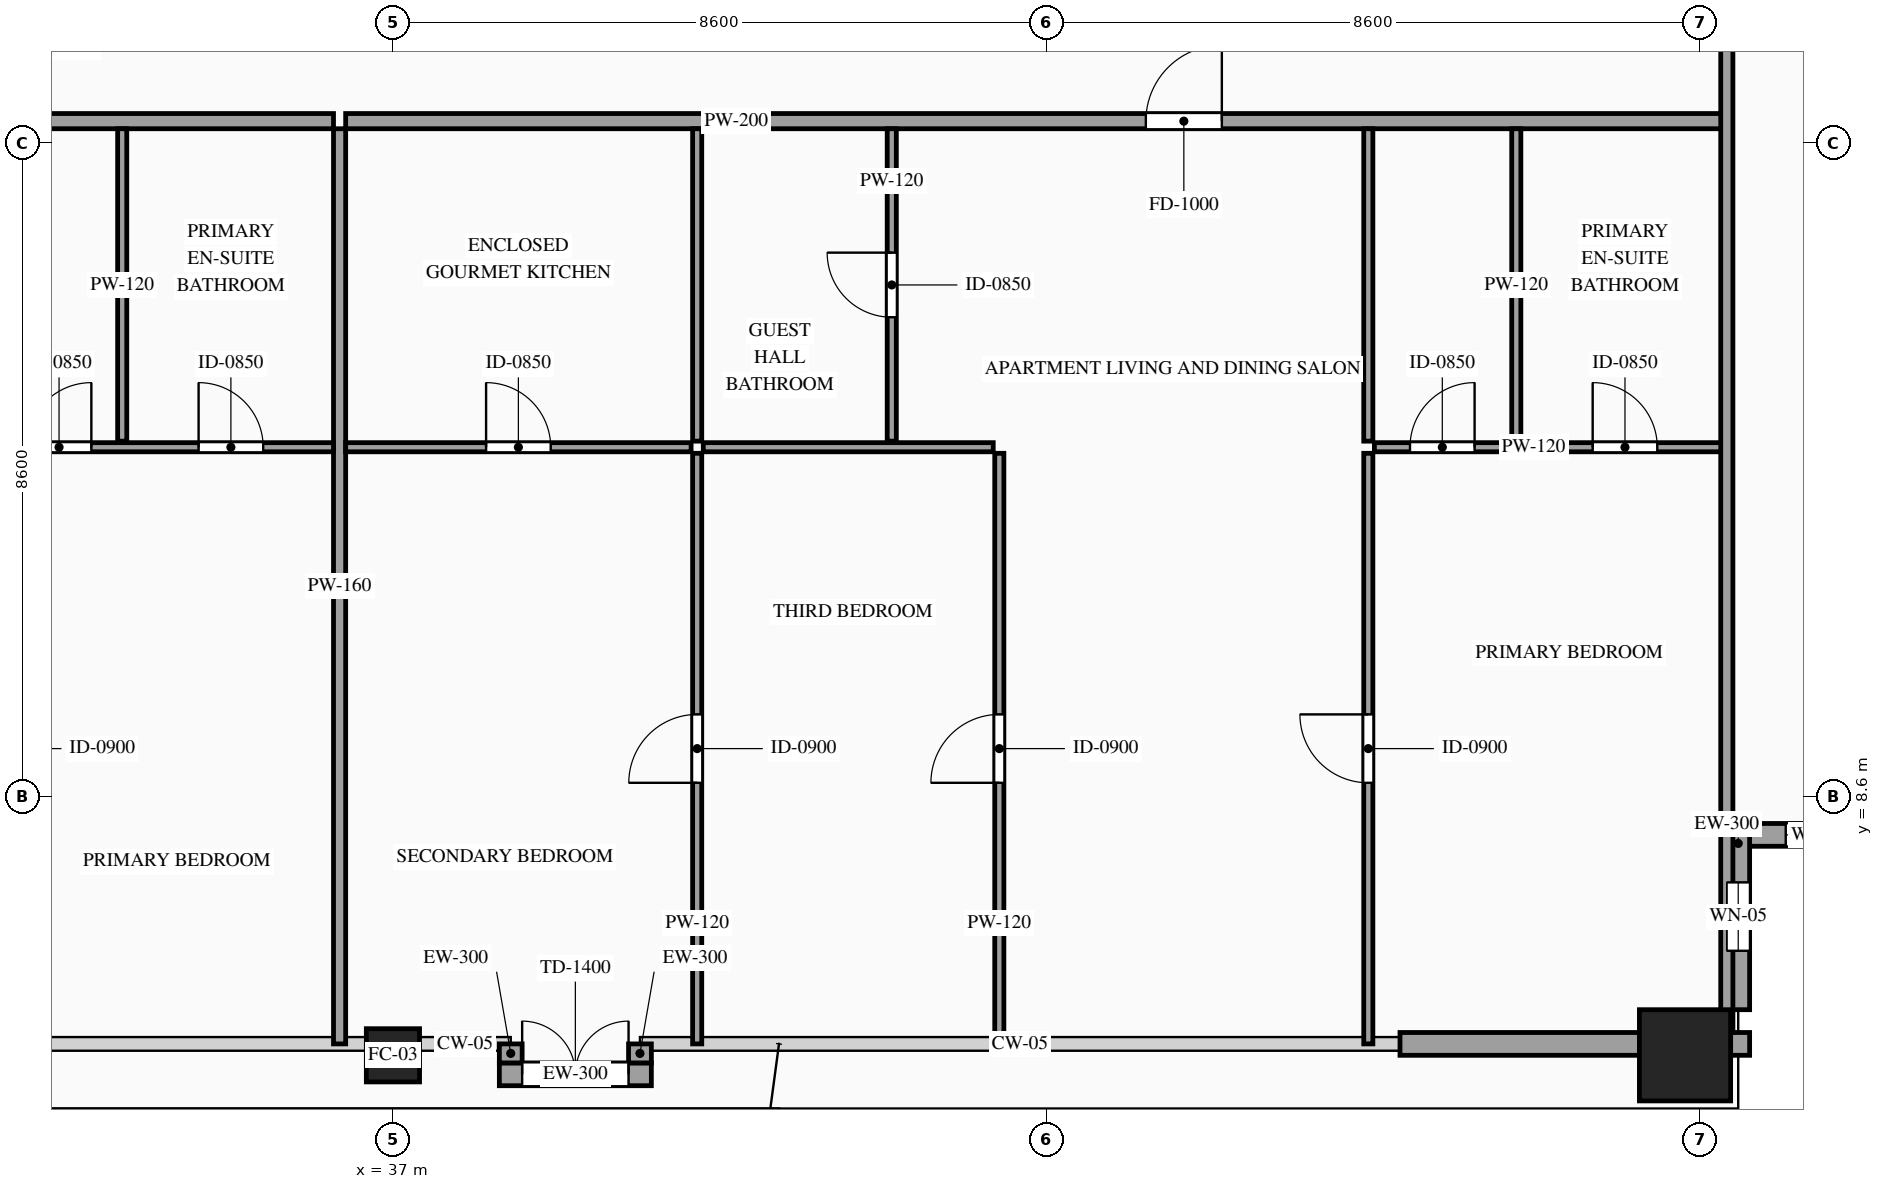
"""IFC4 building model, lengths in metres.
Left out: names, types, materials, properties, quantities, classifications, styles, units other than length and angle.
Written with IfcOpenShell. Run it as: python <this file> out.ifc"""

import sys

from ifc_helpers import new_model, si_unit, direction, frame, frame_2d, origin, origin_2d, place, context, subcontext, project, spatial, rectangle, hollow_rectangle, extrude, source, transform, mapped, element, fill, save


model = new_model("IFC4")
c1 = context("Model", 3, precision=1e-05, world=origin(), true_north=direction((0.0, 1.0)))
c2 = subcontext(c1, "Body", "Model", "MODEL_VIEW")
j1 = project(units=[si_unit("LENGTHUNIT", "METRE"), si_unit("PLANEANGLEUNIT", "RADIAN")], contexts=[c1])
p1 = place(None, origin())
s1 = spatial("IfcSite", under=j1, at=p1, CompositionType="ELEMENT")
p2 = place(p1, origin())
s2 = spatial("IfcBuilding", under=s1, at=p2, CompositionType="ELEMENT")
p3 = place(p2, frame((0.0, 0.0, 255.6)))
s3 = spatial("IfcBuildingStorey", under=s2, at=p3, CompositionType="ELEMENT", Elevation=255.6)
m1 = source(origin(), c2, "Body", "SweptSolid", [
    extrude(hollow_rectangle(XDim=0.7, YDim=0.7, WallThickness=0.032, at=origin_2d()), origin(), (0.0, 0.0, 1.0), 3.5),
])
p4 = place(p3, frame((37.0, 5.2, 0.0), z_axis=(0.0, 0.0, 1.0), x_axis=(1.0, 0.0, 0.0)))
e1 = element("IfcColumn", 1, at=p4, inside=s3, PredefinedType="COLUMN", context=c2, shape_type="MappedRepresentation", body=[
    mapped(m1, transform((0.0, 0.0, 0.0), scale=1.0)),
])
m2 = source(origin(), c2, "Body", "SweptSolid", [
    extrude(hollow_rectangle(XDim=1.2, YDim=1.2, WallThickness=0.055, at=origin_2d()), origin(), (0.0, 0.0, 1.0), 3.5),
])
p5 = place(p3, frame((54.0, 5.2, 0.0), z_axis=(0.0, 0.0, 1.0), x_axis=(1.0, 0.0, 0.0)))
e2 = element("IfcColumn", 2, at=p5, inside=s3, PredefinedType="COLUMN", context=c2, shape_type="MappedRepresentation", body=[
    mapped(m2, transform((0.0, 0.0, 0.0), scale=1.0)),
])
p6 = place(p3, frame((54.55, 8.1, 0.0), z_axis=(0.0, 0.0, 1.0), x_axis=(1.0, 0.0, 0.0)))
e3 = element("IfcWall", 3, at=p6, inside=s3, PredefinedType="SOLIDWALL", context=c2, shape_type="SweptSolid", body=[
    extrude(rectangle(XDim=2.45, YDim=0.3, at=frame_2d((1.225, 0.0))), origin(), (0.0, 0.0, 1.0), 3.2),
])
p7 = place(p6, frame((0.775, 0.0, 0.75)))
e4 = element("IfcOpeningElement", 4, at=p7, cuts=e3, PredefinedType="OPENING", context=c2, shape_type="SweptSolid", body=[
    extrude(rectangle(XDim=0.9, YDim=1.5, at=frame_2d((0.45, 0.75))), frame((0.0, 0.165, 0.0), z_axis=(0.0, -1.0, 0.0), x_axis=(1.0, 0.0, 0.0)), (0.0, 0.0, 1.0), 0.33),
])
p8 = place(p3, frame((54.7, 5.8, 0.0), z_axis=(0.0, 0.0, 1.0), x_axis=(0.0, 1.0, 0.0)))
e5 = element("IfcWall", 5, at=p8, inside=s3, PredefinedType="SOLIDWALL", context=c2, shape_type="SweptSolid", body=[
    extrude(rectangle(XDim=2.45, YDim=0.3, at=frame_2d((1.225, 0.0))), origin(), (0.0, 0.0, 1.0), 3.2),
])
p9 = place(p8, frame((0.775, 0.0, 0.75)))
e6 = element("IfcOpeningElement", 6, at=p9, cuts=e5, PredefinedType="OPENING", context=c2, shape_type="SweptSolid", body=[
    extrude(rectangle(XDim=0.9, YDim=1.5, at=frame_2d((0.45, 0.75))), frame((0.0, 0.165, 0.0), z_axis=(0.0, -1.0, 0.0), x_axis=(1.0, 0.0, 0.0)), (0.0, 0.0, 1.0), 0.33),
])
m3 = source(origin(), c2, "Body", "SweptSolid", [
    extrude(rectangle(XDim=0.25, YDim=0.3, at=frame_2d((0.125, 0.0))), origin(), (0.0, 0.0, 1.0), 3.2),
])
p10 = place(p3, frame((54.6, 5.35, 0.0), z_axis=(0.0, 0.0, 1.0), x_axis=(1.0, 0.0, 0.0)))
e7 = element("IfcWall", 7, at=p10, inside=s3, PredefinedType="SOLIDWALL", context=c2, shape_type="MappedRepresentation", body=[
    mapped(m3, transform((0.0, 0.0, 0.0), scale=1.0)),
])
m4 = source(origin(), c2, "Body", "SweptSolid", [
    extrude(rectangle(XDim=3.15, YDim=0.3, at=frame_2d((1.575, 0.0))), origin(), (0.0, 0.0, 1.0), 2.755),
])
p11 = place(p3, frame((50.25, 5.35, 0.0), z_axis=(0.0, 0.0, 1.0), x_axis=(1.0, 0.0, 0.0)))
e8 = element("IfcWall", 8, at=p11, inside=s3, PredefinedType="SOLIDWALL", context=c2, shape_type="MappedRepresentation", body=[
    mapped(m4, transform((0.0, 0.0, 0.0), scale=1.0)),
])
p12 = place(p3, frame((38.4, 4.95, 0.0), z_axis=(0.0, 0.0, 1.0), x_axis=(1.0, 0.0, 0.0)))
e9 = element("IfcWall", 9, at=p12, inside=s3, PredefinedType="SOLIDWALL", context=c2, shape_type="SweptSolid", body=[
    extrude(rectangle(XDim=2.0, YDim=0.3, at=frame_2d((1.0, 0.0))), origin(), (0.0, 0.0, 1.0), 2.755),
])
p13 = place(p12, frame((0.3, 0.0, 0.0)))
e10 = element("IfcOpeningElement", 10, at=p13, cuts=e9, PredefinedType="OPENING", context=c2, shape_type="SweptSolid", body=[
    extrude(rectangle(XDim=1.4, YDim=2.3, at=frame_2d((0.7, 1.15))), frame((0.0, 0.165, 0.0), z_axis=(0.0, -1.0, 0.0), x_axis=(1.0, 0.0, 0.0)), (0.0, 0.0, 1.0), 0.33),
])
for number, where, z_axis, x_axis in (
    (11, (38.55, 5.35, 0.0), (0.0, 0.0, 1.0), (0.0, -1.0, 0.0)),
    (12, (40.25, 5.1, 0.0), (0.0, 0.0, 1.0), (0.0, 1.0, 0.0)),
):
    element("IfcWall", number, at=place(p3, frame(where, z_axis=z_axis, x_axis=x_axis)), inside=s3, PredefinedType="SOLIDWALL", context=c2, shape_type="MappedRepresentation", body=[
        mapped(m3, transform((0.0, 0.0, 0.0), scale=1.0)),
    ])
p14 = place(p3, frame((19.44, 17.49, 0.0), z_axis=(0.0, 0.0, 1.0), x_axis=(1.0, 0.0, 0.0)))
e13 = element("IfcWall", 13, at=p14, inside=s3, PredefinedType="PARTITIONING", context=c2, shape_type="SweptSolid", body=[
    extrude(rectangle(XDim=16.778, YDim=0.2, at=frame_2d((8.389, 0.0))), origin(), (0.0, 0.0, 1.0), 3.2),
])
p15 = place(p14, frame((9.695, 0.0, 0.0)))
e14 = element("IfcOpeningElement", 14, at=p15, cuts=e13, PredefinedType="OPENING", context=c2, shape_type="SweptSolid", body=[
    extrude(rectangle(XDim=1.0, YDim=2.2, at=frame_2d((0.5, 1.1))), frame((0.0, 0.115, 0.0), z_axis=(0.0, -1.0, 0.0), x_axis=(1.0, 0.0, 0.0)), (0.0, 0.0, 1.0), 0.23),
])
m5 = source(origin(), c2, "Body", "SweptSolid", [
    extrude(rectangle(XDim=12.04, YDim=0.16, at=frame_2d((6.02, 0.0))), origin(), (0.0, 0.0, 1.0), 3.2),
])
p16 = place(p3, frame((36.298, 5.35, 0.0), z_axis=(0.0, 0.0, 1.0), x_axis=(0.0, 1.0, 0.0)))
e15 = element("IfcWall", 15, at=p16, inside=s3, PredefinedType="PARTITIONING", context=c2, shape_type="MappedRepresentation", body=[
    mapped(m5, transform((0.0, 0.0, 0.0), scale=1.0)),
])
m6 = source(origin(), c2, "Body", "SweptSolid", [
    extrude(rectangle(XDim=4.11, YDim=0.12, at=frame_2d((2.055, 0.0))), origin(), (0.0, 0.0, 1.0), 3.2),
])
p17 = place(p3, frame((33.438, 13.28, 0.0), z_axis=(0.0, 0.0, 1.0), x_axis=(0.0, 1.0, 0.0)))
e16 = element("IfcWall", 16, at=p17, inside=s3, PredefinedType="PARTITIONING", context=c2, shape_type="MappedRepresentation", body=[
    mapped(m6, transform((0.0, 0.0, 0.0), scale=1.0)),
])
p18 = place(p3, frame((31.856, 13.2, 0.0), z_axis=(0.0, 0.0, 1.0), x_axis=(1.0, 0.0, 0.0)))
e17 = element("IfcWall", 17, at=p18, inside=s3, PredefinedType="PARTITIONING", context=c2, shape_type="SweptSolid", body=[
    extrude(rectangle(XDim=4.362, YDim=0.12, at=frame_2d((2.181, 0.0))), origin(), (0.0, 0.0, 1.0), 3.2),
])
p19 = place(p18, frame((2.587, 0.0, 0.0)))
e18 = element("IfcOpeningElement", 18, at=p19, cuts=e17, PredefinedType="OPENING", context=c2, shape_type="SweptSolid", body=[
    extrude(rectangle(XDim=0.85, YDim=2.1, at=frame_2d((0.425, 1.05))), frame((0.0, 0.075, 0.0), z_axis=(0.0, -1.0, 0.0), x_axis=(1.0, 0.0, 0.0)), (0.0, 0.0, 1.0), 0.15),
])
p20 = place(p18, frame((0.326, 0.0, 0.0)))
e19 = element("IfcOpeningElement", 19, at=p20, cuts=e17, PredefinedType="OPENING", context=c2, shape_type="SweptSolid", body=[
    extrude(rectangle(XDim=0.85, YDim=2.1, at=frame_2d((0.425, 1.05))), frame((0.0, 0.075, 0.0), z_axis=(0.0, -1.0, 0.0), x_axis=(1.0, 0.0, 0.0)), (0.0, 0.0, 1.0), 0.15),
])
p21 = place(p3, frame((36.378, 17.49, 0.0), z_axis=(0.0, 0.0, 1.0), x_axis=(1.0, 0.0, 0.0)))
e20 = element("IfcWall", 20, at=p21, inside=s3, PredefinedType="PARTITIONING", context=c2, shape_type="SweptSolid", body=[
    extrude(rectangle(XDim=18.182, YDim=0.2, at=frame_2d((9.091, 0.0))), origin(), (0.0, 0.0, 1.0), 3.2),
])
p22 = place(p21, frame((10.528, 0.0, 0.0)))
e21 = element("IfcOpeningElement", 21, at=p22, cuts=e20, PredefinedType="OPENING", context=c2, shape_type="SweptSolid", body=[
    extrude(rectangle(XDim=1.0, YDim=2.2, at=frame_2d((0.5, 1.1))), frame((0.0, 0.115, 0.0), z_axis=(0.0, -1.0, 0.0), x_axis=(1.0, 0.0, 0.0)), (0.0, 0.0, 1.0), 0.23),
])
p23 = place(p3, frame((36.378, 13.2, 0.0), z_axis=(0.0, 0.0, 1.0), x_axis=(1.0, 0.0, 0.0)))
e22 = element("IfcWall", 22, at=p23, inside=s3, PredefinedType="PARTITIONING", context=c2, shape_type="SweptSolid", body=[
    extrude(rectangle(XDim=4.545, YDim=0.12, at=frame_2d((2.272, 0.0))), origin(), (0.0, 0.0, 1.0), 3.2),
])
p24 = place(p23, frame((1.847, 0.0, 0.0)))
e23 = element("IfcOpeningElement", 23, at=p24, cuts=e22, PredefinedType="OPENING", context=c2, shape_type="SweptSolid", body=[
    extrude(rectangle(XDim=0.85, YDim=2.1, at=frame_2d((0.425, 1.05))), frame((0.0, 0.075, 0.0), z_axis=(0.0, -1.0, 0.0), x_axis=(1.0, 0.0, 0.0)), (0.0, 0.0, 1.0), 0.15),
])
p25 = place(p3, frame((41.003, 13.28, 0.0), z_axis=(0.0, 0.0, 1.0), x_axis=(0.0, 1.0, 0.0)))
e24 = element("IfcWall", 24, at=p25, inside=s3, PredefinedType="PARTITIONING", context=c2, shape_type="MappedRepresentation", body=[
    mapped(m6, transform((0.0, 0.0, 0.0), scale=1.0)),
])
p26 = place(p3, frame((43.563, 13.28, 0.0), z_axis=(0.0, 0.0, 1.0), x_axis=(0.0, 1.0, 0.0)))
e25 = element("IfcWall", 25, at=p26, inside=s3, PredefinedType="PARTITIONING", context=c2, shape_type="SweptSolid", body=[
    extrude(rectangle(XDim=4.11, YDim=0.12, at=frame_2d((2.055, 0.0))), origin(), (0.0, 0.0, 1.0), 3.2),
])
p27 = place(p26, frame((1.63, 0.0, 0.0)))
e26 = element("IfcOpeningElement", 26, at=p27, cuts=e25, PredefinedType="OPENING", context=c2, shape_type="SweptSolid", body=[
    extrude(rectangle(XDim=0.85, YDim=2.1, at=frame_2d((0.425, 1.05))), frame((0.0, 0.075, 0.0), z_axis=(0.0, -1.0, 0.0), x_axis=(1.0, 0.0, 0.0)), (0.0, 0.0, 1.0), 0.15),
])
for number, where, z_axis, x_axis in (
    (27, (51.78, 13.28, 0.0), (0.0, 0.0, 1.0), (0.0, 1.0, 0.0)),
    (28, (49.833, 13.28, 0.0), (0.0, 0.0, 1.0), (0.0, 1.0, 0.0)),
):
    element("IfcWall", number, at=place(p3, frame(where, z_axis=z_axis, x_axis=x_axis)), inside=s3, PredefinedType="PARTITIONING", context=c2, shape_type="MappedRepresentation", body=[
        mapped(m6, transform((0.0, 0.0, 0.0), scale=1.0)),
    ])
p28 = place(p3, frame((41.003, 5.35, 0.0), z_axis=(0.0, 0.0, 1.0), x_axis=(0.0, 1.0, 0.0)))
e29 = element("IfcWall", 29, at=p28, inside=s3, PredefinedType="PARTITIONING", context=c2, shape_type="SweptSolid", body=[
    extrude(rectangle(XDim=7.77, YDim=0.12, at=frame_2d((3.885, 0.0))), origin(), (0.0, 0.0, 1.0), 3.2),
])
p29 = place(p28, frame((3.435, 0.0, 0.0)))
e30 = element("IfcOpeningElement", 30, at=p29, cuts=e29, PredefinedType="OPENING", context=c2, shape_type="SweptSolid", body=[
    extrude(rectangle(XDim=0.9, YDim=2.15, at=frame_2d((0.45, 1.075))), frame((0.0, 0.075, 0.0), z_axis=(0.0, -1.0, 0.0), x_axis=(1.0, 0.0, 0.0)), (0.0, 0.0, 1.0), 0.15),
])
p30 = place(p3, frame((49.913, 13.2, 0.0), z_axis=(0.0, 0.0, 1.0), x_axis=(1.0, 0.0, 0.0)))
e31 = element("IfcWall", 31, at=p30, inside=s3, PredefinedType="PARTITIONING", context=c2, shape_type="SweptSolid", body=[
    extrude(rectangle(XDim=4.647, YDim=0.12, at=frame_2d((2.323, 0.0))), origin(), (0.0, 0.0, 1.0), 3.2),
])
p31 = place(p30, frame((2.872, 0.0, 0.0)))
e32 = element("IfcOpeningElement", 32, at=p31, cuts=e31, PredefinedType="OPENING", context=c2, shape_type="SweptSolid", body=[
    extrude(rectangle(XDim=0.85, YDim=2.1, at=frame_2d((0.425, 1.05))), frame((0.0, 0.075, 0.0), z_axis=(0.0, -1.0, 0.0), x_axis=(1.0, 0.0, 0.0)), (0.0, 0.0, 1.0), 0.15),
])
p32 = place(p30, frame((0.469, 0.0, 0.0)))
e33 = element("IfcOpeningElement", 33, at=p32, cuts=e31, PredefinedType="OPENING", context=c2, shape_type="SweptSolid", body=[
    extrude(rectangle(XDim=0.85, YDim=2.1, at=frame_2d((0.425, 1.05))), frame((0.0, 0.075, 0.0), z_axis=(0.0, -1.0, 0.0), x_axis=(1.0, 0.0, 0.0)), (0.0, 0.0, 1.0), 0.15),
])
p33 = place(p3, frame((49.833, 5.35, 0.0), z_axis=(0.0, 0.0, 1.0), x_axis=(0.0, 1.0, 0.0)))
e34 = element("IfcWall", 34, at=p33, inside=s3, PredefinedType="PARTITIONING", context=c2, shape_type="SweptSolid", body=[
    extrude(rectangle(XDim=7.77, YDim=0.12, at=frame_2d((3.885, 0.0))), origin(), (0.0, 0.0, 1.0), 3.2),
])
p34 = place(p33, frame((3.435, 0.0, 0.0)))
e35 = element("IfcOpeningElement", 35, at=p34, cuts=e34, PredefinedType="OPENING", context=c2, shape_type="SweptSolid", body=[
    extrude(rectangle(XDim=0.9, YDim=2.15, at=frame_2d((0.45, 1.075))), frame((0.0, 0.075, 0.0), z_axis=(0.0, -1.0, 0.0), x_axis=(1.0, 0.0, 0.0)), (0.0, 0.0, 1.0), 0.15),
])
m7 = source(origin(), c2, "Body", "SweptSolid", [
    extrude(rectangle(XDim=3.815, YDim=0.12, at=frame_2d((1.907, 0.0))), origin(), (0.0, 0.0, 1.0), 3.2),
])
p35 = place(p3, frame((41.083, 13.2, 0.0), z_axis=(0.0, 0.0, 1.0), x_axis=(1.0, 0.0, 0.0)))
e36 = element("IfcWall", 36, at=p35, inside=s3, PredefinedType="PARTITIONING", context=c2, shape_type="MappedRepresentation", body=[
    mapped(m7, transform((0.0, 0.0, 0.0), scale=1.0)),
])
p36 = place(p3, frame((44.978, 5.35, 0.0), z_axis=(0.0, 0.0, 1.0), x_axis=(0.0, 1.0, 0.0)))
e37 = element("IfcWall", 37, at=p36, inside=s3, PredefinedType="PARTITIONING", context=c2, shape_type="SweptSolid", body=[
    extrude(rectangle(XDim=7.77, YDim=0.12, at=frame_2d((3.885, 0.0))), origin(), (0.0, 0.0, 1.0), 3.2),
])
p37 = place(p36, frame((3.435, 0.0, 0.0)))
e38 = element("IfcOpeningElement", 38, at=p37, cuts=e37, PredefinedType="OPENING", context=c2, shape_type="SweptSolid", body=[
    extrude(rectangle(XDim=0.9, YDim=2.15, at=frame_2d((0.45, 1.075))), frame((0.0, 0.075, 0.0), z_axis=(0.0, -1.0, 0.0), x_axis=(1.0, 0.0, 0.0)), (0.0, 0.0, 1.0), 0.15),
])
m8 = source(origin(), c2, "Body", "SweptSolid", [
    extrude(rectangle(XDim=26.69, YDim=0.16, at=frame_2d((13.345, 0.0))), origin(), (0.0, 0.0, 1.0), 3.2),
])
p38 = place(p3, frame((54.55, 5.5, 0.0), z_axis=(0.0, 0.0, 1.0), x_axis=(0.0, 1.0, 0.0)))
e39 = element("IfcWall", 39, at=p38, inside=s3, PredefinedType="PARTITIONING", context=c2, shape_type="MappedRepresentation", body=[
    mapped(m8, transform((0.0, 0.0, 0.0), scale=1.0)),
])
m9 = source(origin(), c2, "Body", "SweptSolid", [
    extrude(rectangle(XDim=0.9, YDim=1.5, at=frame_2d((0.45, 0.75))), frame((0.0, 0.03, 0.0), z_axis=(0.0, -1.0, 0.0), x_axis=(1.0, 0.0, 0.0)), (0.0, 0.0, 1.0), 0.06),
])
p39 = place(p7, origin())
e40 = element("IfcWindow", 40, at=p39, inside=s3, PartitioningType="SINGLE_PANEL", PredefinedType="WINDOW", context=c2, shape_type="MappedRepresentation", body=[
    mapped(m9, transform((0.0, 0.0, 0.0), scale=1.0)),
])
fill(e4, e40)
p40 = place(p9, origin())
e41 = element("IfcWindow", 41, at=p40, inside=s3, PartitioningType="SINGLE_PANEL", PredefinedType="WINDOW", context=c2, shape_type="MappedRepresentation", body=[
    mapped(m9, transform((0.0, 0.0, 0.0), scale=1.0)),
])
fill(e6, e41)
m10 = source(origin(), c2, "Body", "SweptSolid", [
    extrude(rectangle(XDim=1.4, YDim=2.3, at=frame_2d((0.7, 1.15))), frame((0.0, 0.025, 0.0), z_axis=(0.0, -1.0, 0.0), x_axis=(1.0, 0.0, 0.0)), (0.0, 0.0, 1.0), 0.05),
])
p41 = place(p13, origin())
e42 = element("IfcDoor", 42, at=p41, inside=s3, OperationType="DOUBLE_DOOR_SINGLE_SWING", PredefinedType="DOOR", context=c2, shape_type="MappedRepresentation", body=[
    mapped(m10, transform((0.0, 0.0, 0.0), scale=1.0)),
])
fill(e10, e42)
m11 = source(origin(), c2, "Body", "SweptSolid", [
    extrude(rectangle(XDim=0.85, YDim=2.1, at=frame_2d((0.425, 1.05))), frame((0.0, 0.025, 0.0), z_axis=(0.0, -1.0, 0.0), x_axis=(1.0, 0.0, 0.0)), (0.0, 0.0, 1.0), 0.05),
])
p42 = place(p19, origin())
e43 = element("IfcDoor", 43, at=p42, inside=s3, OperationType="SINGLE_SWING_LEFT", PredefinedType="DOOR", context=c2, shape_type="MappedRepresentation", body=[
    mapped(m11, transform((0.0, 0.0, 0.0), scale=1.0)),
])
fill(e18, e43)
p43 = place(p20, origin())
e44 = element("IfcDoor", 44, at=p43, inside=s3, OperationType="SINGLE_SWING_RIGHT", PredefinedType="DOOR", context=c2, shape_type="MappedRepresentation", body=[
    mapped(m11, transform((0.0, 0.0, 0.0), scale=1.0)),
])
fill(e19, e44)
m12 = source(origin(), c2, "Body", "SweptSolid", [
    extrude(rectangle(XDim=1.0, YDim=2.2, at=frame_2d((0.5, 1.1))), frame((0.0, 0.025, 0.0), z_axis=(0.0, -1.0, 0.0), x_axis=(1.0, 0.0, 0.0)), (0.0, 0.0, 1.0), 0.05),
])
p44 = place(p22, origin())
e45 = element("IfcDoor", 45, at=p44, inside=s3, OperationType="SINGLE_SWING_RIGHT", PredefinedType="DOOR", context=c2, shape_type="MappedRepresentation", body=[
    mapped(m12, transform((0.0, 0.0, 0.0), scale=1.0)),
])
fill(e21, e45)
p45 = place(p24, origin())
e46 = element("IfcDoor", 46, at=p45, inside=s3, OperationType="SINGLE_SWING_LEFT", PredefinedType="DOOR", context=c2, shape_type="MappedRepresentation", body=[
    mapped(m11, transform((0.0, 0.0, 0.0), scale=1.0)),
])
fill(e23, e46)
p46 = place(p27, origin())
e47 = element("IfcDoor", 47, at=p46, inside=s3, OperationType="SINGLE_SWING_RIGHT", PredefinedType="DOOR", context=c2, shape_type="MappedRepresentation", body=[
    mapped(m11, transform((0.0, 0.0, 0.0), scale=1.0)),
])
fill(e26, e47)
p47 = place(p31, origin())
e48 = element("IfcDoor", 48, at=p47, inside=s3, OperationType="SINGLE_SWING_LEFT", PredefinedType="DOOR", context=c2, shape_type="MappedRepresentation", body=[
    mapped(m11, transform((0.0, 0.0, 0.0), scale=1.0)),
])
fill(e32, e48)
p48 = place(p32, origin())
e49 = element("IfcDoor", 49, at=p48, inside=s3, OperationType="SINGLE_SWING_RIGHT", PredefinedType="DOOR", context=c2, shape_type="MappedRepresentation", body=[
    mapped(m11, transform((0.0, 0.0, 0.0), scale=1.0)),
])
fill(e33, e49)
m13 = source(origin(), c2, "Body", "SweptSolid", [
    extrude(rectangle(XDim=0.9, YDim=2.15, at=frame_2d((0.45, 1.075))), frame((0.0, 0.025, 0.0), z_axis=(0.0, -1.0, 0.0), x_axis=(1.0, 0.0, 0.0)), (0.0, 0.0, 1.0), 0.05),
])
p49 = place(p29, origin())
e50 = element("IfcDoor", 50, at=p49, inside=s3, OperationType="SINGLE_SWING_LEFT", PredefinedType="DOOR", context=c2, shape_type="MappedRepresentation", body=[
    mapped(m13, transform((0.0, 0.0, 0.0), scale=1.0)),
])
fill(e30, e50)
p50 = place(p34, origin())
e51 = element("IfcDoor", 51, at=p50, inside=s3, OperationType="SINGLE_SWING_RIGHT", PredefinedType="DOOR", context=c2, shape_type="MappedRepresentation", body=[
    mapped(m13, transform((0.0, 0.0, 0.0), scale=1.0)),
])
fill(e35, e51)
p51 = place(p37, origin())
e52 = element("IfcDoor", 52, at=p51, inside=s3, OperationType="SINGLE_SWING_LEFT", PredefinedType="DOOR", context=c2, shape_type="MappedRepresentation", body=[
    mapped(m13, transform((0.0, 0.0, 0.0), scale=1.0)),
])
fill(e38, e52)
save(model, sys.argv[1])
